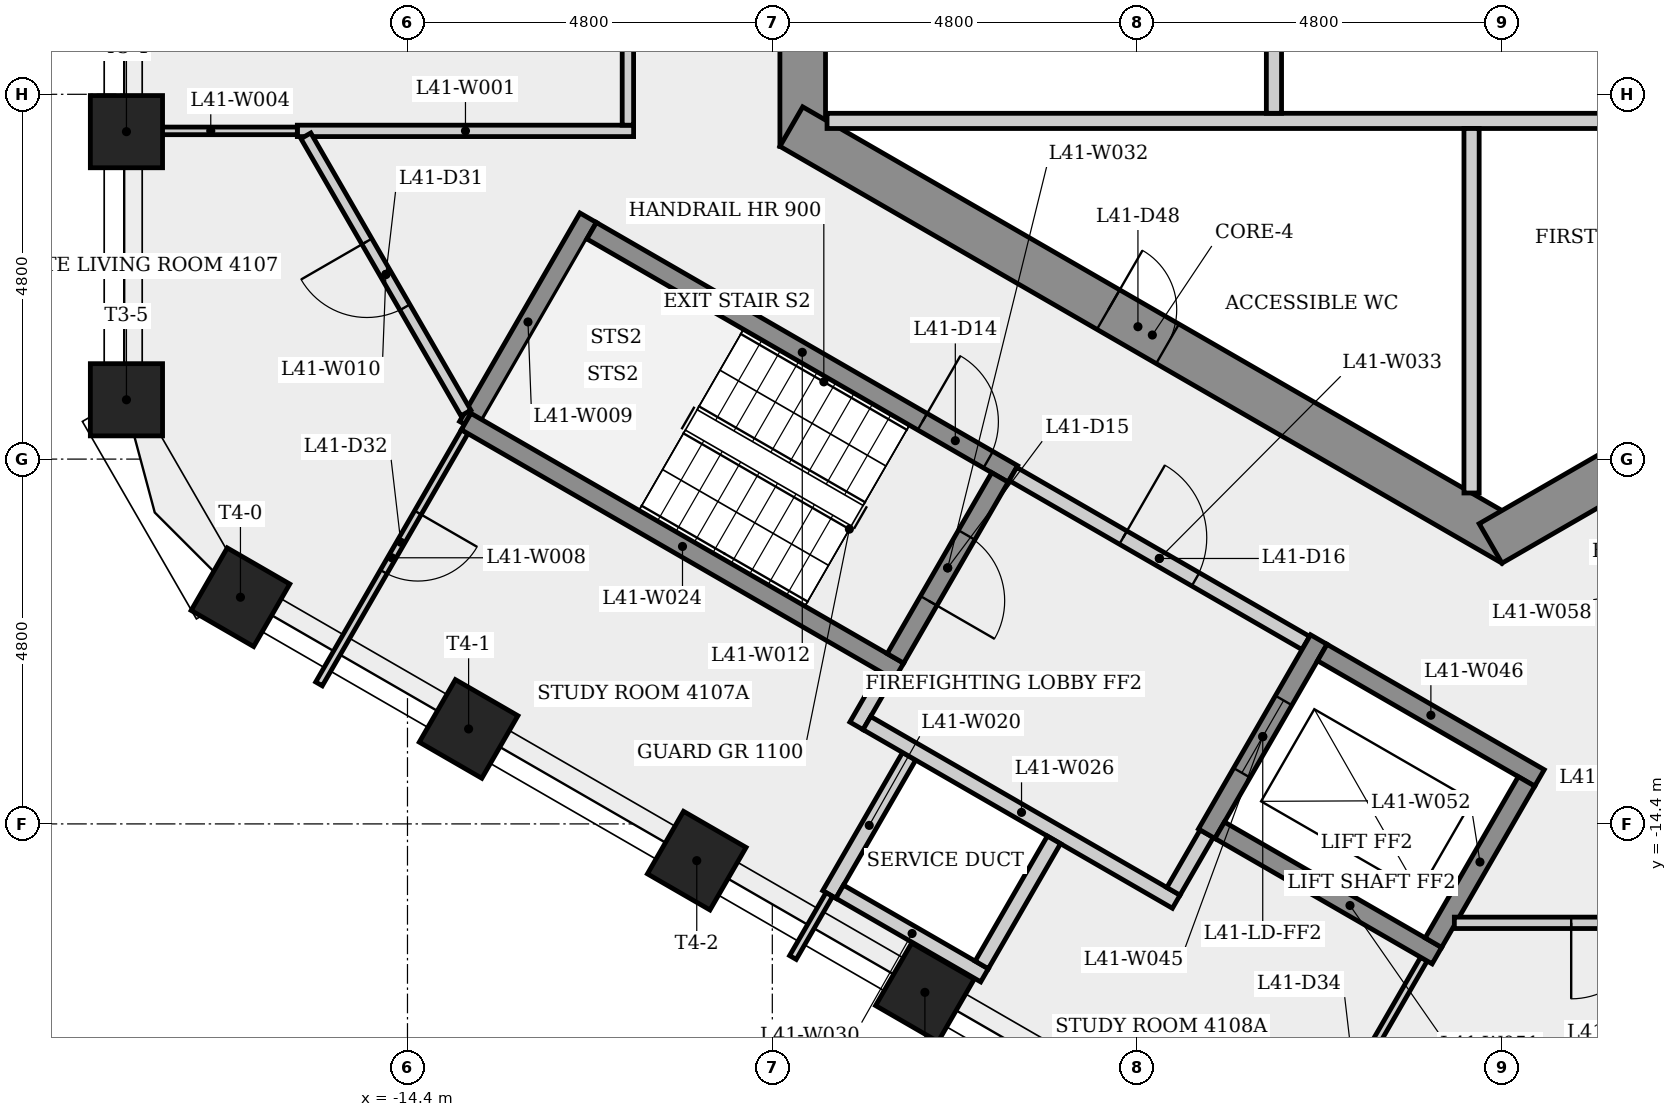
"""IFC4 building model, lengths in metres.
Left out: names, types, materials, properties, quantities, classifications, styles, units other than length and angle.
Written with IfcOpenShell. Run it as: python <this file> out.ifc"""

import sys

from ifc_helpers import new_model, si_unit, direction, frame, frame_2d, origin, origin_2d, place, context, subcontext, project, spatial, rectangle, extrude, element, fill, save


model = new_model("IFC4")
c1 = context("Model", 3, precision=1e-05, world=origin(), true_north=direction((0.0, 1.0)))
c2 = subcontext(c1, "Body", "Model", "MODEL_VIEW")
j1 = project(units=[si_unit("LENGTHUNIT", "METRE"), si_unit("PLANEANGLEUNIT", "RADIAN")], contexts=[c1])
p1 = place(None, origin())
s1 = spatial("IfcSite", under=j1, at=p1, CompositionType="ELEMENT")
p2 = place(p1, origin())
s2 = spatial("IfcBuilding", under=s1, at=p2, CompositionType="ELEMENT")
p3 = place(p2, frame((0.0, 0.0, 156.1)))
s3 = spatial("IfcBuildingStorey", under=s2, at=p3, CompositionType="ELEMENT", Elevation=156.1)
p4 = place(p3, frame((-9.2, 5.485, 0.0), z_axis=(0.0, 0.0, 1.0), x_axis=(0.0, -1.0, 0.0)))
e1 = element("IfcWall", 1, at=p4, inside=s3, PredefinedType="SHEAR", context=c2, shape_type="SweptSolid", body=[
    extrude(rectangle(XDim=10.97, YDim=0.6, at=frame_2d((5.485, 0.0))), origin(), (0.0, 0.0, 1.0), 3.4),
])
p5 = place(p4, frame((8.516, 0.0, 0.0)))
e2 = element("IfcOpeningElement", 2, at=p5, cuts=e1, PredefinedType="OPENING", context=c2, shape_type="SweptSolid", body=[
    extrude(rectangle(XDim=0.9, YDim=2.1, at=frame_2d((0.45, 1.05))), frame((0.0, 0.31, 0.0), z_axis=(0.0, -1.0, 0.0), x_axis=(1.0, 0.0, 0.0)), (0.0, 0.0, 1.0), 0.62),
])
p6 = place(p4, frame((4.685, 0.0, 0.0)))
e3 = element("IfcOpeningElement", 3, at=p6, cuts=e1, PredefinedType="OPENING", context=c2, shape_type="SweptSolid", body=[
    extrude(rectangle(XDim=1.6, YDim=2.1, at=frame_2d((0.8, 1.05))), frame((0.0, 0.31, 0.0), z_axis=(0.0, -1.0, 0.0), x_axis=(1.0, 0.0, 0.0)), (0.0, 0.0, 1.0), 0.62),
])
p7 = place(p3, frame((-9.35, -5.225, 0.0), z_axis=(0.0, 0.0, 1.0), x_axis=(0.866023993627, -0.500002442456, 0.0)))
e4 = element("IfcWall", 4, at=p7, inside=s3, PredefinedType="SHEAR", context=c2, shape_type="SweptSolid", body=[
    extrude(rectangle(XDim=10.97, YDim=0.6, at=frame_2d((5.485, 0.0))), origin(), (0.0, 0.0, 1.0), 3.4),
])
p8 = place(p7, frame((4.816, 0.0, 0.0)))
e5 = element("IfcOpeningElement", 5, at=p8, cuts=e4, PredefinedType="OPENING", context=c2, shape_type="SweptSolid", body=[
    extrude(rectangle(XDim=0.9, YDim=2.1, at=frame_2d((0.45, 1.05))), frame((0.0, 0.31, 0.0), z_axis=(0.0, -1.0, 0.0), x_axis=(1.0, 0.0, 0.0)), (0.0, 0.0, 1.0), 0.62),
])
p9 = place(p3, frame((-0.15, -10.71, 0.0), z_axis=(0.0, 0.0, 1.0), x_axis=(0.866023993627, 0.500002442456, 0.0)))
e6 = element("IfcWall", 6, at=p9, inside=s3, PredefinedType="SHEAR", context=c2, shape_type="SweptSolid", body=[
    extrude(rectangle(XDim=10.97, YDim=0.6, at=frame_2d((5.485, 0.0))), origin(), (0.0, 0.0, 1.0), 3.4),
])
p10 = place(p9, frame((1.975, 0.0, 0.0)))
e7 = element("IfcOpeningElement", 7, at=p10, cuts=e6, PredefinedType="OPENING", context=c2, shape_type="SweptSolid", body=[
    extrude(rectangle(XDim=0.9, YDim=2.1, at=frame_2d((0.45, 1.05))), frame((0.0, 0.31, 0.0), z_axis=(0.0, -1.0, 0.0), x_axis=(1.0, 0.0, 0.0)), (0.0, 0.0, 1.0), 0.62),
])
p11 = place(p9, frame((8.782, 0.0, 0.0)))
e8 = element("IfcOpeningElement", 8, at=p11, cuts=e6, PredefinedType="OPENING", context=c2, shape_type="SweptSolid", body=[
    extrude(rectangle(XDim=0.9, YDim=2.1, at=frame_2d((0.45, 1.05))), frame((0.0, 0.31, 0.0), z_axis=(0.0, -1.0, 0.0), x_axis=(1.0, 0.0, 0.0)), (0.0, 0.0, 1.0), 0.62),
])
for number, where, z_axis, x_axis in (
    (9, (-18.097, -5.292, 0.0), (0.0, 0.0, 1.0), (-1.0, 0.0, 0.0)),
    (10, (-18.097, -8.819, 0.0), (0.0, 0.0, 1.0), (-1.0, 0.0, 0.0)),
    (11, (-16.597, -11.417, 0.0), (0.0, 0.0, 1.0), (-0.5, -0.866, 0.0)),
    (12, (-13.596, -13.15, 0.0), (0.0, 0.0, 1.0), (-0.5, -0.866, 0.0)),
    (13, (-10.594, -14.884, 0.0), (0.0, 0.0, 1.0), (-0.5, -0.866, 0.0)),
    (14, (-7.593, -16.616, 0.0), (0.0, 0.0, 1.0), (-0.5, -0.866, 0.0)),
):
    element("IfcColumn", number, at=place(p3, frame(where, z_axis=z_axis, x_axis=x_axis)), inside=s3, PredefinedType="COLUMN", context=c2, shape_type="SweptSolid", body=[
        extrude(rectangle(XDim=0.95, YDim=0.95, at=origin_2d()), origin(), (0.0, 0.0, 1.0), 3.4),
    ])
p12 = place(p3, frame((-15.849, -5.281, 0.0), z_axis=(0.0, 0.0, 1.0), x_axis=(1.0, 0.0, 0.0)))
e15 = element("IfcWall", 15, at=p12, inside=s3, PredefinedType="PARTITIONING", context=c2, shape_type="SweptSolid", body=[
    extrude(rectangle(XDim=4.425, YDim=0.15, at=frame_2d((2.212, 0.0))), origin(), (0.0, 0.0, 1.0), 3.05),
])
p13 = place(p3, frame((-15.849, -5.281, 0.0), z_axis=(0.0, 0.0, 1.0), x_axis=(-1.0, 0.0, 0.0)))
e16 = element("IfcWall", 16, at=p13, inside=s3, PredefinedType="PARTITIONING", context=c2, shape_type="SweptSolid", body=[
    extrude(rectangle(XDim=2.278, YDim=0.1, at=frame_2d((1.139, 0.0))), origin(), (0.0, 0.0, 1.0), 3.05),
])
p14 = place(p3, frame((-13.648, -9.239, 0.0), z_axis=(0.0, 0.0, 1.0), x_axis=(-0.500044099915, -0.86599994119, 0.0)))
e17 = element("IfcWall", 17, at=p14, inside=s3, PredefinedType="PARTITIONING", context=c2, shape_type="SweptSolid", body=[
    extrude(rectangle(XDim=3.833, YDim=0.1, at=frame_2d((1.917, 0.0))), origin(), (0.0, 0.0, 1.0), 3.05),
])
p15 = place(p14, frame((1.231, 0.0, 0.0)))
e18 = element("IfcOpeningElement", 18, at=p15, cuts=e17, PredefinedType="OPENING", context=c2, shape_type="SweptSolid", body=[
    extrude(rectangle(XDim=0.9, YDim=2.1, at=frame_2d((0.45, 1.05))), frame((0.0, 0.06, 0.0), z_axis=(0.0, -1.0, 0.0), x_axis=(1.0, 0.0, 0.0)), (0.0, 0.0, 1.0), 0.12),
])
p16 = place(p3, frame((-13.606, -9.167, 0.0), z_axis=(0.0, 0.0, 1.0), x_axis=(0.499978282948, 0.866037941767, 0.0)))
e19 = element("IfcWall", 19, at=p16, inside=s3, PredefinedType="SHEAR", context=c2, shape_type="SweptSolid", body=[
    extrude(rectangle(XDim=3.167, YDim=0.25, at=frame_2d((1.583, 0.0))), origin(), (0.0, 0.0, 1.0), 3.05),
])
p17 = place(p3, frame((-13.631, -8.993, 0.0), z_axis=(0.0, 0.0, 1.0), x_axis=(-0.499998449073, 0.866026299211, 0.0)))
e20 = element("IfcWall", 20, at=p17, inside=s3, PredefinedType="PARTITIONING", context=c2, shape_type="SweptSolid", body=[
    extrude(rectangle(XDim=4.211, YDim=0.15, at=frame_2d((2.106, 0.0))), origin(), (0.0, 0.0, 1.0), 3.05),
])
p18 = place(p17, frame((1.606, 0.0, 0.0)))
e21 = element("IfcOpeningElement", 21, at=p18, cuts=e20, PredefinedType="OPENING", context=c2, shape_type="SweptSolid", body=[
    extrude(rectangle(XDim=1.0, YDim=2.1, at=frame_2d((0.5, 1.05))), frame((0.0, 0.085, 0.0), z_axis=(0.0, -1.0, 0.0), x_axis=(1.0, 0.0, 0.0)), (0.0, 0.0, 1.0), 0.17),
])
p19 = place(p3, frame((-11.977, -6.595, 0.0), z_axis=(0.0, 0.0, 1.0), x_axis=(0.866025499775, -0.499999833739, 0.0)))
e22 = element("IfcWall", 22, at=p19, inside=s3, PredefinedType="SHEAR", context=c2, shape_type="SweptSolid", body=[
    extrude(rectangle(XDim=6.4, YDim=0.25, at=frame_2d((3.2, 0.0))), origin(), (0.0, 0.0, 1.0), 3.05),
])
p20 = place(p19, frame((5.025, 0.0, 0.0)))
e23 = element("IfcOpeningElement", 23, at=p20, cuts=e22, PredefinedType="OPENING", context=c2, shape_type="SweptSolid", body=[
    extrude(rectangle(XDim=1.0, YDim=2.1, at=frame_2d((0.5, 1.05))), frame((0.0, 0.135, 0.0), z_axis=(0.0, -1.0, 0.0), x_axis=(1.0, 0.0, 0.0)), (0.0, 0.0, 1.0), 0.27),
])
p21 = place(p3, frame((-11.5, -5.206, 0.0), z_axis=(0.0, 0.0, 1.0), x_axis=(0.0, 1.0, 0.0)))
e24 = element("IfcWall", 24, at=p21, inside=s3, PredefinedType="PARTITIONING", context=c2, shape_type="SweptSolid", body=[
    extrude(rectangle(XDim=10.562, YDim=0.15, at=frame_2d((5.281, 0.0))), origin(), (0.0, 0.0, 1.0), 3.05),
])
p22 = place(p21, frame((9.188, 0.0, 0.0)))
e25 = element("IfcOpeningElement", 25, at=p22, cuts=e24, PredefinedType="OPENING", context=c2, shape_type="SweptSolid", body=[
    extrude(rectangle(XDim=0.9, YDim=2.1, at=frame_2d((0.45, 1.05))), frame((0.0, 0.085, 0.0), z_axis=(0.0, -1.0, 0.0), x_axis=(1.0, 0.0, 0.0)), (0.0, 0.0, 1.0), 0.17),
])
p23 = place(p21, frame((2.969, 0.0, 0.0)))
e26 = element("IfcOpeningElement", 26, at=p23, cuts=e24, PredefinedType="OPENING", context=c2, shape_type="SweptSolid", body=[
    extrude(rectangle(XDim=1.0, YDim=2.1, at=frame_2d((0.5, 1.05))), frame((0.0, 0.085, 0.0), z_axis=(0.0, -1.0, 0.0), x_axis=(1.0, 0.0, 0.0)), (0.0, 0.0, 1.0), 0.17),
])
p24 = place(p3, frame((-8.88, -5.15, 0.0), z_axis=(0.0, 0.0, 1.0), x_axis=(1.0, 0.0, 0.0)))
e27 = element("IfcWall", 27, at=p24, inside=s3, PredefinedType="PARTITIONING", context=c2, shape_type="SweptSolid", body=[
    extrude(rectangle(XDim=11.205, YDim=0.2, at=frame_2d((5.603, 0.0))), origin(), (0.0, 0.0, 1.0), 3.05),
])
p25 = place(p3, frame((-8.85, -15.329, 0.0), z_axis=(0.0, 0.0, 1.0), x_axis=(0.500027713859, 0.866009402589, 0.0)))
e28 = element("IfcWall", 28, at=p25, inside=s3, PredefinedType="PLUMBINGWALL", context=c2, shape_type="SweptSolid", body=[
    extrude(rectangle(XDim=2.1, YDim=0.2, at=frame_2d((1.05, 0.0))), origin(), (0.0, 0.0, 1.0), 3.05),
])
p26 = place(p3, frame((-8.493, -13.11, 0.0), z_axis=(0.0, 0.0, 1.0), x_axis=(0.500067724834, 0.865986299303, 0.0)))
e29 = element("IfcWall", 29, at=p26, inside=s3, PredefinedType="PARTITIONING", context=c2, shape_type="SweptSolid", body=[
    extrude(rectangle(XDim=0.775, YDim=0.2, at=frame_2d((0.388, 0.0))), origin(), (0.0, 0.0, 1.0), 3.05),
])
p27 = place(p3, frame((-7.935, -12.393, 0.0), z_axis=(0.0, 0.0, 1.0), x_axis=(-0.866034091436, 0.499984952244, 0.0)))
e30 = element("IfcWall", 30, at=p27, inside=s3, PredefinedType="SHEAR", context=c2, shape_type="SweptSolid", body=[
    extrude(rectangle(XDim=6.575, YDim=0.25, at=frame_2d((3.288, 0.0))), origin(), (0.0, 0.0, 1.0), 3.05),
])
p28 = place(p3, frame((-9.329, -16.158, 0.0), z_axis=(0.0, 0.0, 1.0), x_axis=(0.499950501706, 0.866053979752, 0.0)))
e31 = element("IfcWall", 31, at=p28, inside=s3, PredefinedType="PARTITIONING", context=c2, shape_type="SweptSolid", body=[
    extrude(rectangle(XDim=0.958, YDim=0.1, at=frame_2d((0.479, 0.0))), origin(), (0.0, 0.0, 1.0), 3.05),
])
p29 = place(p3, frame((-8.356, -13.073, 0.0), z_axis=(0.0, 0.0, 1.0), x_axis=(0.866038532462, -0.499977259774, 0.0)))
e32 = element("IfcWall", 32, at=p29, inside=s3, PredefinedType="PARTITIONING", context=c2, shape_type="SweptSolid", body=[
    extrude(rectangle(XDim=4.7, YDim=0.2, at=frame_2d((2.35, 0.0))), origin(), (0.0, 0.0, 1.0), 3.05),
])
p30 = place(p3, frame((-6.808, -16.392, 0.0), z_axis=(0.0, 0.0, 1.0), x_axis=(-0.866008176907, 0.50002983664, 0.0)))
e33 = element("IfcWall", 33, at=p30, inside=s3, PredefinedType="PLUMBINGWALL", context=c2, shape_type="SweptSolid", body=[
    extrude(rectangle(XDim=2.2, YDim=0.2, at=frame_2d((1.1, 0.0))), origin(), (0.0, 0.0, 1.0), 3.05),
])
p31 = place(p3, frame((-6.605, -9.841, 0.0), z_axis=(0.0, 0.0, 1.0), x_axis=(-0.499996545922, -0.866027397988, 0.0)))
e34 = element("IfcWall", 34, at=p31, inside=s3, PredefinedType="SHEAR", context=c2, shape_type="SweptSolid", body=[
    extrude(rectangle(XDim=2.75, YDim=0.25, at=frame_2d((1.375, 0.0))), origin(), (0.0, 0.0, 1.0), 3.05),
])
p32 = place(p31, frame((0.875, 0.0, 0.0)))
e35 = element("IfcOpeningElement", 35, at=p32, cuts=e34, PredefinedType="OPENING", context=c2, shape_type="SweptSolid", body=[
    extrude(rectangle(XDim=1.0, YDim=2.1, at=frame_2d((0.5, 1.05))), frame((0.0, 0.135, 0.0), z_axis=(0.0, -1.0, 0.0), x_axis=(1.0, 0.0, 0.0)), (0.0, 0.0, 1.0), 0.27),
])
p33 = place(p3, frame((-6.435, -9.795, 0.0), z_axis=(0.0, 0.0, 1.0), x_axis=(0.866012907634, -0.500021643343, 0.0)))
e36 = element("IfcWall", 36, at=p33, inside=s3, PredefinedType="PARTITIONING", context=c2, shape_type="SweptSolid", body=[
    extrude(rectangle(XDim=4.45, YDim=0.2, at=frame_2d((2.225, 0.0))), origin(), (0.0, 0.0, 1.0), 3.05),
])
p34 = place(p33, frame((1.675, 0.0, 0.0)))
e37 = element("IfcOpeningElement", 37, at=p34, cuts=e36, PredefinedType="OPENING", context=c2, shape_type="SweptSolid", body=[
    extrude(rectangle(XDim=1.1, YDim=2.1, at=frame_2d((0.55, 1.05))), frame((0.0, 0.11, 0.0), z_axis=(0.0, -1.0, 0.0), x_axis=(1.0, 0.0, 0.0)), (0.0, 0.0, 1.0), 0.22),
])
p35 = place(p3, frame((-5.895, -14.61, 0.0), z_axis=(0.0, 0.0, 1.0), x_axis=(-0.500022797313, -0.86601224135, 0.0)))
e38 = element("IfcWall", 38, at=p35, inside=s3, PredefinedType="PLUMBINGWALL", context=c2, shape_type="SweptSolid", body=[
    extrude(rectangle(XDim=1.9, YDim=0.2, at=frame_2d((0.95, 0.0))), origin(), (0.0, 0.0, 1.0), 3.05),
])
p36 = place(p3, frame((-3.885, -14.529, 0.0), z_axis=(0.0, 0.0, 1.0), x_axis=(-0.499859285417, -0.866106630146, 0.0)))
e39 = element("IfcWall", 39, at=p36, inside=s3, PredefinedType="PARTITIONING", context=c2, shape_type="SweptSolid", body=[
    extrude(rectangle(XDim=0.875, YDim=0.2, at=frame_2d((0.438, 0.0))), origin(), (0.0, 0.0, 1.0), 3.05),
])
p37 = place(p3, frame((-3.0, -1.9, 0.0), z_axis=(0.0, 0.0, 1.0), x_axis=(0.0, -1.0, 0.0)))
e40 = element("IfcWall", 40, at=p37, inside=s3, PredefinedType="PARTITIONING", context=c2, shape_type="SweptSolid", body=[
    extrude(rectangle(XDim=3.15, YDim=0.2, at=frame_2d((1.575, 0.0))), origin(), (0.0, 0.0, 1.0), 3.05),
])
p38 = place(p3, frame((-3.094, -19.758, 0.0), z_axis=(0.0, 0.0, 1.0), x_axis=(0.500027577057, 0.866009481578, 0.0)))
e41 = element("IfcWall", 41, at=p38, inside=s3, PredefinedType="PARTITIONING", context=c2, shape_type="SweptSolid", body=[
    extrude(rectangle(XDim=4.133, YDim=0.1, at=frame_2d((2.066, 0.0))), origin(), (0.0, 0.0, 1.0), 3.05),
])
p39 = place(p38, frame((1.852, 0.0, 0.0)))
e42 = element("IfcOpeningElement", 42, at=p39, cuts=e41, PredefinedType="OPENING", context=c2, shape_type="SweptSolid", body=[
    extrude(rectangle(XDim=0.9, YDim=2.1, at=frame_2d((0.45, 1.05))), frame((0.0, 0.06, 0.0), z_axis=(0.0, -1.0, 0.0), x_axis=(1.0, 0.0, 0.0)), (0.0, 0.0, 1.0), 0.12),
])
p40 = place(p3, frame((-2.41, -11.974, 0.0), z_axis=(0.0, 0.0, 1.0), x_axis=(-0.500001826776, -0.866024349092, 0.0)))
e43 = element("IfcWall", 43, at=p40, inside=s3, PredefinedType="SHEAR", context=c2, shape_type="SweptSolid", body=[
    extrude(rectangle(XDim=2.95, YDim=0.25, at=frame_2d((1.475, 0.0))), origin(), (0.0, 0.0, 1.0), 3.05),
])
p41 = place(p40, frame((0.925, 0.0, 0.0)))
e44 = element("IfcOpeningElement", 44, at=p41, cuts=e43, PredefinedType="OPENING", context=c2, shape_type="SweptSolid", body=[
    extrude(rectangle(XDim=1.1, YDim=2.1, at=frame_2d((0.55, 1.05))), frame((0.0, 0.135, 0.0), z_axis=(0.0, -1.0, 0.0), x_axis=(1.0, 0.0, 0.0)), (0.0, 0.0, 1.0), 0.27),
])
p42 = place(p3, frame((-2.364, -12.145, 0.0), z_axis=(0.0, 0.0, 1.0), x_axis=(0.866040211805, -0.499974350878, 0.0)))
e45 = element("IfcWall", 45, at=p42, inside=s3, PredefinedType="SHEAR", context=c2, shape_type="SweptSolid", body=[
    extrude(rectangle(XDim=3.3, YDim=0.25, at=frame_2d((1.65, 0.0))), origin(), (0.0, 0.0, 1.0), 3.05),
])
p43 = place(p3, frame((-0.856, -16.133, 0.0), z_axis=(0.0, 0.0, 1.0), x_axis=(-0.866021716278, 0.500006386895, 0.0)))
e46 = element("IfcWall", 46, at=p43, inside=s3, PredefinedType="SHEAR", context=c2, shape_type="SweptSolid", body=[
    extrude(rectangle(XDim=3.3, YDim=0.25, at=frame_2d((1.65, 0.0))), origin(), (0.0, 0.0, 1.0), 3.05),
])
p44 = place(p3, frame((-0.902, -15.962, 0.0), z_axis=(0.0, 0.0, 1.0), x_axis=(0.500061746146, 0.865989751695, 0.0)))
e47 = element("IfcWall", 47, at=p44, inside=s3, PredefinedType="SHEAR", context=c2, shape_type="SweptSolid", body=[
    extrude(rectangle(XDim=2.45, YDim=0.25, at=frame_2d((1.225, 0.0))), origin(), (0.0, 0.0, 1.0), 3.4),
])
p45 = place(p3, frame((-0.4, -5.25, 0.0), z_axis=(0.0, 0.0, 1.0), x_axis=(0.0, -1.0, 0.0)))
e48 = element("IfcWall", 48, at=p45, inside=s3, PredefinedType="PARTITIONING", context=c2, shape_type="SweptSolid", body=[
    extrude(rectangle(XDim=4.796, YDim=0.2, at=frame_2d((2.398, 0.0))), origin(), (0.0, 0.0, 1.0), 3.05),
])
p46 = place(p3, frame((3.448, -15.702, 0.0), z_axis=(0.0, 0.0, 1.0), x_axis=(-1.0, 0.0, 0.0)))
e49 = element("IfcWall", 49, at=p46, inside=s3, PredefinedType="PARTITIONING", context=c2, shape_type="SweptSolid", body=[
    extrude(rectangle(XDim=4.074, YDim=0.15, at=frame_2d((2.037, 0.0))), origin(), (0.0, 0.0, 1.0), 3.05),
])
p47 = place(p46, frame((1.537, 0.0, 0.0)))
e50 = element("IfcOpeningElement", 50, at=p47, cuts=e49, PredefinedType="OPENING", context=c2, shape_type="SweptSolid", body=[
    extrude(rectangle(XDim=1.0, YDim=2.1, at=frame_2d((0.5, 1.05))), frame((0.0, 0.085, 0.0), z_axis=(0.0, -1.0, 0.0), x_axis=(1.0, 0.0, 0.0)), (0.0, 0.0, 1.0), 0.17),
])
p48 = place(p20, origin())
e51 = element("IfcDoor", 51, at=p48, inside=s3, OperationType="SINGLE_SWING_LEFT", PredefinedType="DOOR", context=c2, shape_type="SweptSolid", body=[
    extrude(rectangle(XDim=1.0, YDim=2.1, at=frame_2d((0.5, 1.05))), frame((0.0, 0.025, 0.0), z_axis=(0.0, -1.0, 0.0), x_axis=(1.0, 0.0, 0.0)), (0.0, 0.0, 1.0), 0.05),
])
fill(e23, e51)
p49 = place(p32, origin())
e52 = element("IfcDoor", 52, at=p49, inside=s3, OperationType="SINGLE_SWING_RIGHT", PredefinedType="DOOR", context=c2, shape_type="SweptSolid", body=[
    extrude(rectangle(XDim=1.0, YDim=2.1, at=frame_2d((0.5, 1.05))), frame((0.0, 0.025, 0.0), z_axis=(0.0, -1.0, 0.0), x_axis=(1.0, 0.0, 0.0)), (0.0, 0.0, 1.0), 0.05),
])
fill(e35, e52)
p50 = place(p34, origin())
e53 = element("IfcDoor", 53, at=p50, inside=s3, OperationType="SINGLE_SWING_LEFT", PredefinedType="DOOR", context=c2, shape_type="SweptSolid", body=[
    extrude(rectangle(XDim=1.1, YDim=2.1, at=frame_2d((0.55, 1.05))), frame((0.0, 0.025, 0.0), z_axis=(0.0, -1.0, 0.0), x_axis=(1.0, 0.0, 0.0)), (0.0, 0.0, 1.0), 0.05),
])
fill(e37, e53)
p51 = place(p41, origin())
e54 = element("IfcDoor", 54, at=p51, inside=s3, OperationType="SLIDING_TO_LEFT", PredefinedType="DOOR", context=c2, shape_type="SweptSolid", body=[
    extrude(rectangle(XDim=1.1, YDim=2.1, at=frame_2d((0.55, 1.05))), frame((0.0, 0.025, 0.0), z_axis=(0.0, -1.0, 0.0), x_axis=(1.0, 0.0, 0.0)), (0.0, 0.0, 1.0), 0.05),
])
fill(e44, e54)
p52 = place(p18, origin())
e55 = element("IfcDoor", 55, at=p52, inside=s3, OperationType="SINGLE_SWING_RIGHT", PredefinedType="DOOR", context=c2, shape_type="SweptSolid", body=[
    extrude(rectangle(XDim=1.0, YDim=2.1, at=frame_2d((0.5, 1.05))), frame((0.0, 0.025, 0.0), z_axis=(0.0, -1.0, 0.0), x_axis=(1.0, 0.0, 0.0)), (0.0, 0.0, 1.0), 0.05),
])
fill(e21, e55)
p53 = place(p15, origin())
e56 = element("IfcDoor", 56, at=p53, inside=s3, OperationType="SINGLE_SWING_LEFT", PredefinedType="DOOR", context=c2, shape_type="SweptSolid", body=[
    extrude(rectangle(XDim=0.9, YDim=2.1, at=frame_2d((0.45, 1.05))), frame((0.0, 0.025, 0.0), z_axis=(0.0, -1.0, 0.0), x_axis=(1.0, 0.0, 0.0)), (0.0, 0.0, 1.0), 0.05),
])
fill(e18, e56)
p54 = place(p47, origin())
e57 = element("IfcDoor", 57, at=p54, inside=s3, OperationType="SINGLE_SWING_RIGHT", PredefinedType="DOOR", context=c2, shape_type="SweptSolid", body=[
    extrude(rectangle(XDim=1.0, YDim=2.1, at=frame_2d((0.5, 1.05))), frame((0.0, 0.025, 0.0), z_axis=(0.0, -1.0, 0.0), x_axis=(1.0, 0.0, 0.0)), (0.0, 0.0, 1.0), 0.05),
])
fill(e50, e57)
p55 = place(p8, origin())
e58 = element("IfcDoor", 58, at=p55, inside=s3, OperationType="SINGLE_SWING_LEFT", PredefinedType="DOOR", context=c2, shape_type="SweptSolid", body=[
    extrude(rectangle(XDim=0.9, YDim=2.1, at=frame_2d((0.45, 1.05))), frame((0.0, 0.025, 0.0), z_axis=(0.0, -1.0, 0.0), x_axis=(1.0, 0.0, 0.0)), (0.0, 0.0, 1.0), 0.05),
])
fill(e5, e58)
save(model, sys.argv[1])
